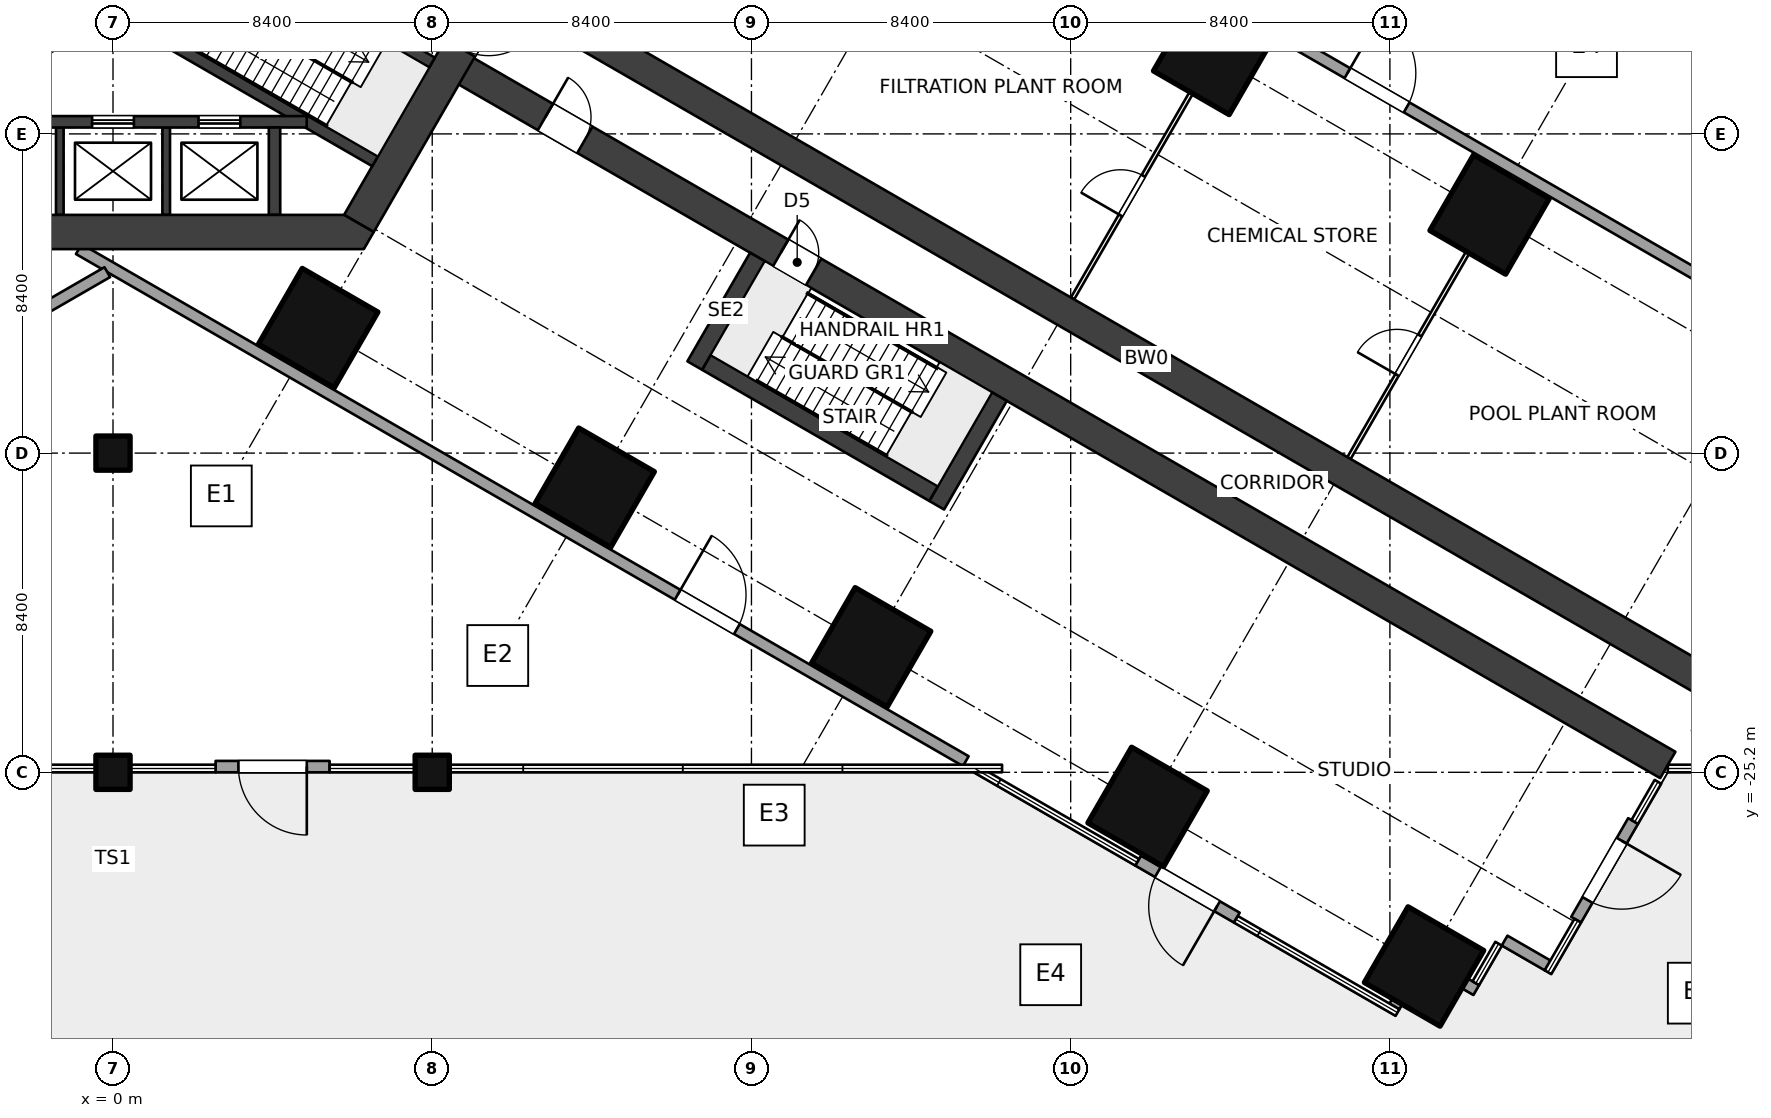
"""IFC4 building model, lengths in metres.
Left out: names, types, materials, properties, quantities, classifications, styles, units other than length and angle.
Written with IfcOpenShell. Run it as: python <this file> out.ifc"""

import sys

from ifc_helpers import new_model, si_unit, direction, frame, frame_2d, origin, origin_2d, place, context, subcontext, project, spatial, polyline, rectangle, outline, extrude, element, fill, save


model = new_model("IFC4")
c1 = context("Model", 3, precision=1e-05, world=origin(), true_north=direction((0.0, 1.0)))
c2 = subcontext(c1, "Body", "Model", "MODEL_VIEW")
j1 = project(units=[si_unit("LENGTHUNIT", "METRE"), si_unit("PLANEANGLEUNIT", "RADIAN")], contexts=[c1])
p1 = place(None, origin())
s1 = spatial("IfcSite", under=j1, at=p1, CompositionType="ELEMENT")
p2 = place(p1, origin())
s2 = spatial("IfcBuilding", under=s1, at=p2, CompositionType="ELEMENT")
p3 = place(p2, frame((0.0, 0.0, 11.0)))
s3 = spatial("IfcBuildingStorey", under=s2, at=p3, CompositionType="ELEMENT", Elevation=11.0)
for number, where, z_axis, x_axis in (
    (1, (5.4, -13.51, 0.0), (0.0, 0.0, 1.0), (-0.5, -0.866, 0.0)),
    (2, (12.675, -17.71, 0.0), (0.0, 0.0, 1.0), (-0.5, -0.866, 0.0)),
    (3, (28.949, -6.322, 0.0), (0.0, 0.0, 1.0), (-0.5, -0.866, 0.0)),
    (4, (19.949, -21.91, 0.0), (0.0, 0.0, 1.0), (-0.5, -0.866, 0.0)),
    (5, (36.224, -10.521, 0.0), (0.0, 0.0, 1.0), (-0.5, -0.866, 0.0)),
    (6, (27.224, -26.11, 0.0), (0.0, 0.0, 1.0), (-0.5, -0.866, 0.0)),
    (7, (34.499, -30.31, 0.0), (0.0, 0.0, 1.0), (-0.5, -0.866, 0.0)),
):
    element("IfcColumn", number, at=place(p3, frame(where, z_axis=z_axis, x_axis=x_axis)), inside=s3, PredefinedType="COLUMN", context=c2, shape_type="SweptSolid", body=[
        extrude(rectangle(XDim=2.3, YDim=2.3, at=origin_2d()), origin(), (0.0, 0.0, 1.0), 5.0),
    ])
for number, where, z_axis, x_axis in (
    (8, (0.0, -25.2, 0.0), (0.0, 0.0, 1.0), (1.0, 0.0, 0.0)),
    (9, (0.0, -16.8, 0.0), (0.0, 0.0, 1.0), (1.0, 0.0, 0.0)),
    (10, (8.4, -25.2, 0.0), (0.0, 0.0, 1.0), (1.0, 0.0, 0.0)),
):
    element("IfcColumn", number, at=place(p3, frame(where, z_axis=z_axis, x_axis=x_axis)), inside=s3, PredefinedType="COLUMN", context=c2, shape_type="SweptSolid", body=[
        extrude(rectangle(XDim=0.9, YDim=0.9, at=origin_2d()), origin(), (0.0, 0.0, 1.0), 5.0),
    ])
p4 = place(p3, frame((12.551, -0.225, 0.0), z_axis=(0.0, 0.0, 1.0), x_axis=(-0.499997612506, -0.8660267822, 0.0)))
e11 = element("IfcWall", 11, at=p4, inside=s3, PredefinedType="SHEAR", context=c2, shape_type="SweptSolid", body=[
    extrude(rectangle(XDim=12.161, YDim=0.9, at=frame_2d((6.08, 0.0))), origin(), (0.0, 0.0, 1.0), 5.0),
])
p5 = place(p4, frame((5.33, 0.0, 0.0)))
e12 = element("IfcOpeningElement", 12, at=p5, cuts=e11, PredefinedType="OPENING", context=c2, shape_type="SweptSolid", body=[
    extrude(rectangle(XDim=1.5, YDim=2.1, at=frame_2d((0.75, 1.05))), frame((0.0, 0.46, 0.0), z_axis=(0.0, -1.0, 0.0), x_axis=(1.0, 0.0, 0.0)), (0.0, 0.0, 1.0), 0.92),
])
p6 = place(p3, origin())
e13 = element("IfcWall", 13, at=p6, inside=s3, PredefinedType="SHEAR", context=c2, shape_type="SweptSolid", body=[
    extrude(outline(polyline([(-6.6, -11.432), (6.6, -11.432), (6.86, -10.981), (6.08, -10.531), (-6.08, -10.531), (-6.86, -10.981), (-6.6, -11.432)])), origin(), (0.0, 0.0, 1.0), 5.0),
])
p7 = place(p3, frame((-0.919, -5.669, 0.0), z_axis=(0.0, 0.0, 1.0), x_axis=(-0.866011800373, -0.500023561059, 0.0)))
e14 = element("IfcWall", 14, at=p7, inside=s3, PredefinedType="SHEAR", context=c2, shape_type="SweptSolid", body=[
    extrude(rectangle(XDim=6.902, YDim=0.3, at=frame_2d((3.451, 0.0))), origin(), (0.0, 0.0, 1.0), 5.0),
])
p8 = place(p3, frame((2.419, -3.071, 0.0), z_axis=(0.0, 0.0, 1.0), x_axis=(0.86602711848, -0.499997030048, 0.0)))
e15 = element("IfcWall", 15, at=p8, inside=s3, PredefinedType="SHEAR", context=c2, shape_type="SweptSolid", body=[
    extrude(rectangle(XDim=6.901, YDim=0.3, at=frame_2d((3.451, 0.0))), origin(), (0.0, 0.0, 1.0), 5.0),
])
p9 = place(p8, frame((0.25, 0.0, 0.0)))
e16 = element("IfcOpeningElement", 16, at=p9, cuts=e15, PredefinedType="OPENING", context=c2, shape_type="SweptSolid", body=[
    extrude(rectangle(XDim=1.0, YDim=2.1, at=frame_2d((0.5, 1.05))), frame((0.0, 0.16, 0.0), z_axis=(0.0, -1.0, 0.0), x_axis=(1.0, 0.0, 0.0)), (0.0, 0.0, 1.0), 0.32),
])
p10 = place(p3, frame((0.919, -5.669, 0.0), z_axis=(0.0, 0.0, 1.0), x_axis=(0.866011800373, -0.500023561059, 0.0)))
e17 = element("IfcWall", 17, at=p10, inside=s3, PredefinedType="SHEAR", context=c2, shape_type="SweptSolid", body=[
    extrude(rectangle(XDim=6.902, YDim=0.3, at=frame_2d((3.451, 0.0))), origin(), (0.0, 0.0, 1.0), 5.0),
])
p11 = place(p3, frame((5.098, -8.082, 0.0), z_axis=(0.0, 0.0, 1.0), x_axis=(-1.0, 0.0, 0.0)))
e18 = element("IfcWall", 18, at=p11, inside=s3, PredefinedType="SHEAR", context=c2, shape_type="SweptSolid", body=[
    extrude(rectangle(XDim=10.195, YDim=0.3, at=frame_2d((5.098, 0.0))), origin(), (0.0, 0.0, 1.0), 5.0),
])
p12 = place(p11, frame((1.748, 0.0, 0.0)))
e19 = element("IfcOpeningElement", 19, at=p12, cuts=e18, PredefinedType="OPENING", context=c2, shape_type="SweptSolid", body=[
    extrude(rectangle(XDim=1.1, YDim=2.1, at=frame_2d((0.55, 1.05))), frame((0.0, 0.16, 0.0), z_axis=(0.0, -1.0, 0.0), x_axis=(1.0, 0.0, 0.0)), (0.0, 0.0, 1.0), 0.32),
])
p13 = place(p11, frame((4.548, 0.0, 0.0)))
e20 = element("IfcOpeningElement", 20, at=p13, cuts=e18, PredefinedType="OPENING", context=c2, shape_type="SweptSolid", body=[
    extrude(rectangle(XDim=1.1, YDim=2.1, at=frame_2d((0.55, 1.05))), frame((0.0, 0.16, 0.0), z_axis=(0.0, -1.0, 0.0), x_axis=(1.0, 0.0, 0.0)), (0.0, 0.0, 1.0), 0.32),
])
p14 = place(p11, frame((7.348, 0.0, 0.0)))
e21 = element("IfcOpeningElement", 21, at=p14, cuts=e18, PredefinedType="OPENING", context=c2, shape_type="SweptSolid", body=[
    extrude(rectangle(XDim=1.1, YDim=2.1, at=frame_2d((0.55, 1.05))), frame((0.0, 0.16, 0.0), z_axis=(0.0, -1.0, 0.0), x_axis=(1.0, 0.0, 0.0)), (0.0, 0.0, 1.0), 0.32),
])
p15 = place(p3, frame((4.25, -8.231, 0.0), z_axis=(0.0, 0.0, 1.0), x_axis=(0.0, -1.0, 0.0)))
e22 = element("IfcWall", 22, at=p15, inside=s3, PredefinedType="SHEAR", context=c2, shape_type="SweptSolid", body=[
    extrude(rectangle(XDim=2.3, YDim=0.3, at=frame_2d((1.15, 0.0))), origin(), (0.0, 0.0, 1.0), 5.0),
])
for number, where, z_axis, x_axis in (
    (23, (1.4, -8.231, 0.0), (0.0, 0.0, 1.0), (0.0, -1.0, 0.0)),
    (24, (-1.4, -8.231, 0.0), (0.0, 0.0, 1.0), (0.0, -1.0, 0.0)),
):
    element("IfcWall", number, at=place(p3, frame(where, z_axis=z_axis, x_axis=x_axis)), inside=s3, PredefinedType="SHEAR", context=c2, shape_type="SweptSolid", body=[
        extrude(rectangle(XDim=2.3, YDim=0.2, at=frame_2d((1.15, 0.0))), origin(), (0.0, 0.0, 1.0), 5.0),
    ])
p16 = place(p3, frame((10.11, -4.451, 0.0), z_axis=(0.0, 0.0, 1.0), x_axis=(0.866025284237, -0.500000207062, 0.0)))
e25 = element("IfcWall", 25, at=p16, inside=s3, PredefinedType="SHEAR", context=c2, shape_type="SweptSolid", body=[
    extrude(rectangle(XDim=36.75, YDim=0.8, at=frame_2d((18.375, 0.0))), origin(), (0.0, 0.0, 1.0), 5.0),
])
p17 = place(p16, frame((1.35, 0.0, 0.0)))
e26 = element("IfcOpeningElement", 26, at=p17, cuts=e25, PredefinedType="OPENING", context=c2, shape_type="SweptSolid", body=[
    extrude(rectangle(XDim=1.2, YDim=2.1, at=frame_2d((0.6, 1.05))), frame((0.0, 0.41, 0.0), z_axis=(0.0, -1.0, 0.0), x_axis=(1.0, 0.0, 0.0)), (0.0, 0.0, 1.0), 0.82),
])
p18 = place(p3, frame((8.91, -6.53, 0.0), z_axis=(0.0, 0.0, 1.0), x_axis=(0.866024404313, -0.500001731131, 0.0)))
e27 = element("IfcWall", 27, at=p18, inside=s3, PredefinedType="SHEAR", context=c2, shape_type="SweptSolid", body=[
    extrude(rectangle(XDim=36.953, YDim=0.8, at=frame_2d((18.477, 0.0))), origin(), (0.0, 0.0, 1.0), 5.0),
])
p19 = place(p18, frame((10.0, 0.0, 0.0)))
e28 = element("IfcOpeningElement", 28, at=p19, cuts=e27, PredefinedType="OPENING", context=c2, shape_type="SweptSolid", body=[
    extrude(rectangle(XDim=1.0, YDim=2.1, at=frame_2d((0.5, 1.05))), frame((0.0, 0.41, 0.0), z_axis=(0.0, -1.0, 0.0), x_axis=(1.0, 0.0, 0.0)), (0.0, 0.0, 1.0), 0.82),
])
p20 = place(p18, frame((2.85, 0.0, 0.0)))
e29 = element("IfcOpeningElement", 29, at=p20, cuts=e27, PredefinedType="OPENING", context=c2, shape_type="SweptSolid", body=[
    extrude(rectangle(XDim=1.2, YDim=2.1, at=frame_2d((0.6, 1.05))), frame((0.0, 0.41, 0.0), z_axis=(0.0, -1.0, 0.0), x_axis=(1.0, 0.0, 0.0)), (0.0, 0.0, 1.0), 0.82),
])
p21 = place(p3, frame((40.0, -26.481, 0.0), z_axis=(0.0, 0.0, 1.0), x_axis=(-0.499990139034, -0.866031096941, 0.0)))
e30 = element("IfcWall", 30, at=p21, inside=s3, PredefinedType="SOLIDWALL", context=c2, shape_type="SweptSolid", body=[
    extrude(rectangle(XDim=3.0, YDim=0.3, at=frame_2d((1.5, 0.0))), origin(), (0.0, 0.0, 1.0), 3.1),
])
p22 = place(p21, frame((0.6, 0.0, 0.0)))
e31 = element("IfcOpeningElement", 31, at=p22, cuts=e30, PredefinedType="OPENING", context=c2, shape_type="SweptSolid", body=[
    extrude(rectangle(XDim=1.8, YDim=2.4, at=frame_2d((0.9, 1.2))), frame((0.0, 0.16, 0.0), z_axis=(0.0, -1.0, 0.0), x_axis=(1.0, 0.0, 0.0)), (0.0, 0.0, 1.0), 0.32),
])
p23 = place(p3, frame((37.753, -30.283, 0.0), z_axis=(0.0, 0.0, 1.0), x_axis=(-0.866101796549, 0.4998676605, 0.0)))
e32 = element("IfcWall", 32, at=p23, inside=s3, PredefinedType="SOLIDWALL", context=c2, shape_type="SweptSolid", body=[
    extrude(rectangle(XDim=1.31, YDim=0.3, at=frame_2d((0.655, 0.0))), origin(), (0.0, 0.0, 1.0), 4.7),
])
p24 = place(p3, frame((35.873, -30.93, 0.0), z_axis=(0.0, 0.0, 1.0), x_axis=(-0.865939549016, 0.500148675346, 0.0)))
e33 = element("IfcWall", 33, at=p24, inside=s3, PredefinedType="SOLIDWALL", context=c2, shape_type="SweptSolid", body=[
    extrude(rectangle(XDim=0.347, YDim=0.3, at=frame_2d((0.174, 0.0))), origin(), (0.0, 0.0, 1.0), 4.7),
])
p25 = place(p3, frame((34.219, -30.495, 0.0), z_axis=(0.0, 0.0, 1.0), x_axis=(-0.499953773667, -0.866052090925, 0.0)))
e34 = element("IfcWall", 34, at=p25, inside=s3, PredefinedType="SOLIDWALL", context=c2, shape_type="SweptSolid", body=[
    extrude(rectangle(XDim=1.005, YDim=0.3, at=frame_2d((0.502, 0.0))), origin(), (0.0, 0.0, 1.0), 4.7),
])
p26 = place(p3, frame((29.572, -29.025, 0.0), z_axis=(0.0, 0.0, 1.0), x_axis=(-0.866010750942, 0.50002537861, 0.0)))
e35 = element("IfcWall", 35, at=p26, inside=s3, PredefinedType="SOLIDWALL", context=c2, shape_type="SweptSolid", body=[
    extrude(rectangle(XDim=3.0, YDim=0.3, at=frame_2d((1.5, 0.0))), origin(), (0.0, 0.0, 1.0), 4.7),
])
p27 = place(p26, frame((0.6, 0.0, 0.0)))
e36 = element("IfcOpeningElement", 36, at=p27, cuts=e35, PredefinedType="OPENING", context=c2, shape_type="SweptSolid", body=[
    extrude(rectangle(XDim=1.8, YDim=2.4, at=frame_2d((0.9, 1.2))), frame((0.0, 0.16, 0.0), z_axis=(0.0, -1.0, 0.0), x_axis=(1.0, 0.0, 0.0)), (0.0, 0.0, 1.0), 0.32),
])
p28 = place(p3, frame((5.7, -25.05, 0.0), z_axis=(0.0, 0.0, 1.0), x_axis=(-1.0, 0.0, 0.0)))
e37 = element("IfcWall", 37, at=p28, inside=s3, PredefinedType="SOLIDWALL", context=c2, shape_type="SweptSolid", body=[
    extrude(rectangle(XDim=3.0, YDim=0.3, at=frame_2d((1.5, 0.0))), origin(), (0.0, 0.0, 1.0), 3.7),
])
p29 = place(p28, frame((0.6, 0.0, 0.0)))
e38 = element("IfcOpeningElement", 38, at=p29, cuts=e37, PredefinedType="OPENING", context=c2, shape_type="SweptSolid", body=[
    extrude(rectangle(XDim=1.8, YDim=2.4, at=frame_2d((0.9, 1.2))), frame((0.0, 0.16, 0.0), z_axis=(0.0, -1.0, 0.0), x_axis=(1.0, 0.0, 0.0)), (0.0, 0.0, 1.0), 0.32),
])
p30 = place(p3, frame((25.249, -12.73, 0.0), z_axis=(0.0, 0.0, 1.0), x_axis=(0.499987320047, 0.866032724435, 0.0)))
e39 = element("IfcWall", 39, at=p30, inside=s3, PredefinedType="PARTITIONING", context=c2, shape_type="SweptSolid", body=[
    extrude(rectangle(XDim=6.25, YDim=0.1, at=frame_2d((3.125, 0.0))), origin(), (0.0, 0.0, 1.0), 2.9),
])
p31 = place(p30, frame((2.525, 0.0, 0.0)))
e40 = element("IfcOpeningElement", 40, at=p31, cuts=e39, PredefinedType="OPENING", context=c2, shape_type="SweptSolid", body=[
    extrude(rectangle(XDim=1.2, YDim=2.1, at=frame_2d((0.6, 1.05))), frame((0.0, 0.06, 0.0), z_axis=(0.0, -1.0, 0.0), x_axis=(1.0, 0.0, 0.0)), (0.0, 0.0, 1.0), 0.12),
])
p32 = place(p3, frame((32.524, -16.93, 0.0), z_axis=(0.0, 0.0, 1.0), x_axis=(0.500004234368, 0.866022959057, 0.0)))
e41 = element("IfcWall", 41, at=p32, inside=s3, PredefinedType="PARTITIONING", context=c2, shape_type="SweptSolid", body=[
    extrude(rectangle(XDim=6.25, YDim=0.1, at=frame_2d((3.125, 0.0))), origin(), (0.0, 0.0, 1.0), 2.9),
])
p33 = place(p32, frame((2.525, 0.0, 0.0)))
e42 = element("IfcOpeningElement", 42, at=p33, cuts=e41, PredefinedType="OPENING", context=c2, shape_type="SweptSolid", body=[
    extrude(rectangle(XDim=1.2, YDim=2.1, at=frame_2d((0.6, 1.05))), frame((0.0, 0.06, 0.0), z_axis=(0.0, -1.0, 0.0), x_axis=(1.0, 0.0, 0.0)), (0.0, 0.0, 1.0), 0.12),
])
p34 = place(p3, frame((-0.15, -12.038, 0.0), z_axis=(0.0, 0.0, 1.0), x_axis=(-0.866030473254, -0.499991219318, 0.0)))
e43 = element("IfcWall", 43, at=p34, inside=s3, PredefinedType="SOLIDWALL", context=c2, shape_type="SweptSolid", body=[
    extrude(rectangle(XDim=25.739, YDim=0.3, at=frame_2d((12.869, 0.0))), origin(), (0.0, 0.0, 1.0), 4.7),
])
p35 = place(p34, frame((16.983, 0.0, 0.0)))
e44 = element("IfcOpeningElement", 44, at=p35, cuts=e43, PredefinedType="OPENING", context=c2, shape_type="SweptSolid", body=[
    extrude(rectangle(XDim=1.8, YDim=2.4, at=frame_2d((0.9, 1.2))), frame((0.0, 0.16, 0.0), z_axis=(0.0, -1.0, 0.0), x_axis=(1.0, 0.0, 0.0)), (0.0, 0.0, 1.0), 0.32),
])
p36 = place(p3, frame((9.45, 6.495, 0.0), z_axis=(0.0, 0.0, 1.0), x_axis=(0.866025301493, -0.500000177174, 0.0)))
e45 = element("IfcWall", 45, at=p36, inside=s3, PredefinedType="SOLIDWALL", context=c2, shape_type="SweptSolid", body=[
    extrude(rectangle(XDim=43.095, YDim=0.3, at=frame_2d((21.548, 0.0))), origin(), (0.0, 0.0, 1.0), 4.7),
])
p37 = place(p36, frame((26.595, 0.0, 0.0)))
e46 = element("IfcOpeningElement", 46, at=p37, cuts=e45, PredefinedType="OPENING", context=c2, shape_type="SweptSolid", body=[
    extrude(rectangle(XDim=1.8, YDim=2.4, at=frame_2d((0.9, 1.2))), frame((0.0, 0.16, 0.0), z_axis=(0.0, -1.0, 0.0), x_axis=(1.0, 0.0, 0.0)), (0.0, 0.0, 1.0), 0.32),
])
p38 = place(p3, frame((-0.9, -11.432, 0.0), z_axis=(0.0, 0.0, 1.0), x_axis=(0.866028700395, -0.49999429006, 0.0)))
e47 = element("IfcWall", 47, at=p38, inside=s3, PredefinedType="SOLIDWALL", context=c2, shape_type="SweptSolid", body=[
    extrude(rectangle(XDim=26.951, YDim=0.3, at=frame_2d((13.476, 0.0))), origin(), (0.0, 0.0, 1.0), 4.7),
])
p39 = place(p38, frame((18.195, 0.0, 0.0)))
e48 = element("IfcOpeningElement", 48, at=p39, cuts=e47, PredefinedType="OPENING", context=c2, shape_type="SweptSolid", body=[
    extrude(rectangle(XDim=1.8, YDim=2.4, at=frame_2d((0.9, 1.2))), frame((0.0, 0.16, 0.0), z_axis=(0.0, -1.0, 0.0), x_axis=(1.0, 0.0, 0.0)), (0.0, 0.0, 1.0), 0.32),
])
for number, where, z_axis, x_axis in (
    (49, (16.959, -11.639, 0.0), (0.0, 0.0, 1.0), (-0.5, -0.866, 0.0)),
    (50, (23.324, -15.314, 0.0), (0.0, 0.0, 1.0), (-0.5, -0.866, 0.0)),
):
    element("IfcWall", number, at=place(p3, frame(where, z_axis=z_axis, x_axis=x_axis)), inside=s3, PredefinedType="SOLIDWALL", context=c2, shape_type="SweptSolid", body=[
        extrude(rectangle(XDim=3.3, YDim=0.45, at=frame_2d((1.65, 0.0))), origin(), (0.0, 0.0, 1.0), 5.0),
    ])
p40 = place(p3, frame((15.616, -14.415, 0.0), z_axis=(0.0, 0.0, 1.0), x_axis=(0.866028853923, -0.499994024137, 0.0)))
e51 = element("IfcWall", 51, at=p40, inside=s3, PredefinedType="SOLIDWALL", context=c2, shape_type="SweptSolid", body=[
    extrude(rectangle(XDim=6.9, YDim=0.45, at=frame_2d((3.45, 0.0))), origin(), (0.0, 0.0, 1.0), 5.0),
])
p41 = place(p22, origin())
e52 = element("IfcDoor", 52, at=p41, inside=s3, OperationType="DOUBLE_DOOR_SINGLE_SWING", PredefinedType="DOOR", context=c2, shape_type="SweptSolid", body=[
    extrude(rectangle(XDim=1.8, YDim=2.4, at=frame_2d((0.9, 1.2))), frame((0.0, 0.025, 0.0), z_axis=(0.0, -1.0, 0.0), x_axis=(1.0, 0.0, 0.0)), (0.0, 0.0, 1.0), 0.05),
])
fill(e31, e52)
p42 = place(p27, origin())
e53 = element("IfcDoor", 53, at=p42, inside=s3, OperationType="DOUBLE_DOOR_SINGLE_SWING", PredefinedType="DOOR", context=c2, shape_type="SweptSolid", body=[
    extrude(rectangle(XDim=1.8, YDim=2.4, at=frame_2d((0.9, 1.2))), frame((0.0, 0.025, 0.0), z_axis=(0.0, -1.0, 0.0), x_axis=(1.0, 0.0, 0.0)), (0.0, 0.0, 1.0), 0.05),
])
fill(e36, e53)
p43 = place(p29, origin())
e54 = element("IfcDoor", 54, at=p43, inside=s3, OperationType="DOUBLE_DOOR_SINGLE_SWING", PredefinedType="DOOR", context=c2, shape_type="SweptSolid", body=[
    extrude(rectangle(XDim=1.8, YDim=2.4, at=frame_2d((0.9, 1.2))), frame((0.0, 0.025, 0.0), z_axis=(0.0, -1.0, 0.0), x_axis=(1.0, 0.0, 0.0)), (0.0, 0.0, 1.0), 0.05),
])
fill(e38, e54)
p44 = place(p12, origin())
e55 = element("IfcDoor", 55, at=p44, inside=s3, OperationType="DOUBLE_DOOR_SLIDING", PredefinedType="DOOR", context=c2, shape_type="SweptSolid", body=[
    extrude(rectangle(XDim=1.1, YDim=2.1, at=frame_2d((0.55, 1.05))), frame((0.0, 0.025, 0.0), z_axis=(0.0, -1.0, 0.0), x_axis=(1.0, 0.0, 0.0)), (0.0, 0.0, 1.0), 0.05),
])
fill(e19, e55)
p45 = place(p13, origin())
e56 = element("IfcDoor", 56, at=p45, inside=s3, OperationType="DOUBLE_DOOR_SLIDING", PredefinedType="DOOR", context=c2, shape_type="SweptSolid", body=[
    extrude(rectangle(XDim=1.1, YDim=2.1, at=frame_2d((0.55, 1.05))), frame((0.0, 0.025, 0.0), z_axis=(0.0, -1.0, 0.0), x_axis=(1.0, 0.0, 0.0)), (0.0, 0.0, 1.0), 0.05),
])
fill(e20, e56)
p46 = place(p19, origin())
e57 = element("IfcDoor", 57, at=p46, inside=s3, OperationType="SINGLE_SWING_LEFT", PredefinedType="DOOR", context=c2, shape_type="SweptSolid", body=[
    extrude(rectangle(XDim=1.0, YDim=2.1, at=frame_2d((0.5, 1.05))), frame((0.0, 0.025, 0.0), z_axis=(0.0, -1.0, 0.0), x_axis=(1.0, 0.0, 0.0)), (0.0, 0.0, 1.0), 0.05),
])
fill(e28, e57)
p47 = place(p31, origin())
e58 = element("IfcDoor", 58, at=p47, inside=s3, OperationType="DOUBLE_SWING_LEFT", PredefinedType="DOOR", context=c2, shape_type="SweptSolid", body=[
    extrude(rectangle(XDim=1.2, YDim=2.1, at=frame_2d((0.6, 1.05))), frame((0.0, 0.025, 0.0), z_axis=(0.0, -1.0, 0.0), x_axis=(1.0, 0.0, 0.0)), (0.0, 0.0, 1.0), 0.05),
])
fill(e40, e58)
p48 = place(p33, origin())
e59 = element("IfcDoor", 59, at=p48, inside=s3, OperationType="DOUBLE_SWING_LEFT", PredefinedType="DOOR", context=c2, shape_type="SweptSolid", body=[
    extrude(rectangle(XDim=1.2, YDim=2.1, at=frame_2d((0.6, 1.05))), frame((0.0, 0.025, 0.0), z_axis=(0.0, -1.0, 0.0), x_axis=(1.0, 0.0, 0.0)), (0.0, 0.0, 1.0), 0.05),
])
fill(e42, e59)
p49 = place(p20, origin())
e60 = element("IfcDoor", 60, at=p49, inside=s3, OperationType="DOUBLE_SWING_LEFT", PredefinedType="DOOR", context=c2, shape_type="SweptSolid", body=[
    extrude(rectangle(XDim=1.2, YDim=2.1, at=frame_2d((0.6, 1.05))), frame((0.0, 0.025, 0.0), z_axis=(0.0, -1.0, 0.0), x_axis=(1.0, 0.0, 0.0)), (0.0, 0.0, 1.0), 0.05),
])
fill(e29, e60)
p50 = place(p37, origin())
e61 = element("IfcDoor", 61, at=p50, inside=s3, OperationType="DOUBLE_DOOR_DOUBLE_SWING", PredefinedType="DOOR", context=c2, shape_type="SweptSolid", body=[
    extrude(rectangle(XDim=1.8, YDim=2.4, at=frame_2d((0.9, 1.2))), frame((0.0, 0.025, 0.0), z_axis=(0.0, -1.0, 0.0), x_axis=(1.0, 0.0, 0.0)), (0.0, 0.0, 1.0), 0.05),
])
fill(e46, e61)
p51 = place(p39, origin())
e62 = element("IfcDoor", 62, at=p51, inside=s3, OperationType="DOUBLE_DOOR_DOUBLE_SWING", PredefinedType="DOOR", context=c2, shape_type="SweptSolid", body=[
    extrude(rectangle(XDim=1.8, YDim=2.4, at=frame_2d((0.9, 1.2))), frame((0.0, 0.025, 0.0), z_axis=(0.0, -1.0, 0.0), x_axis=(1.0, 0.0, 0.0)), (0.0, 0.0, 1.0), 0.05),
])
fill(e48, e62)
save(model, sys.argv[1])
